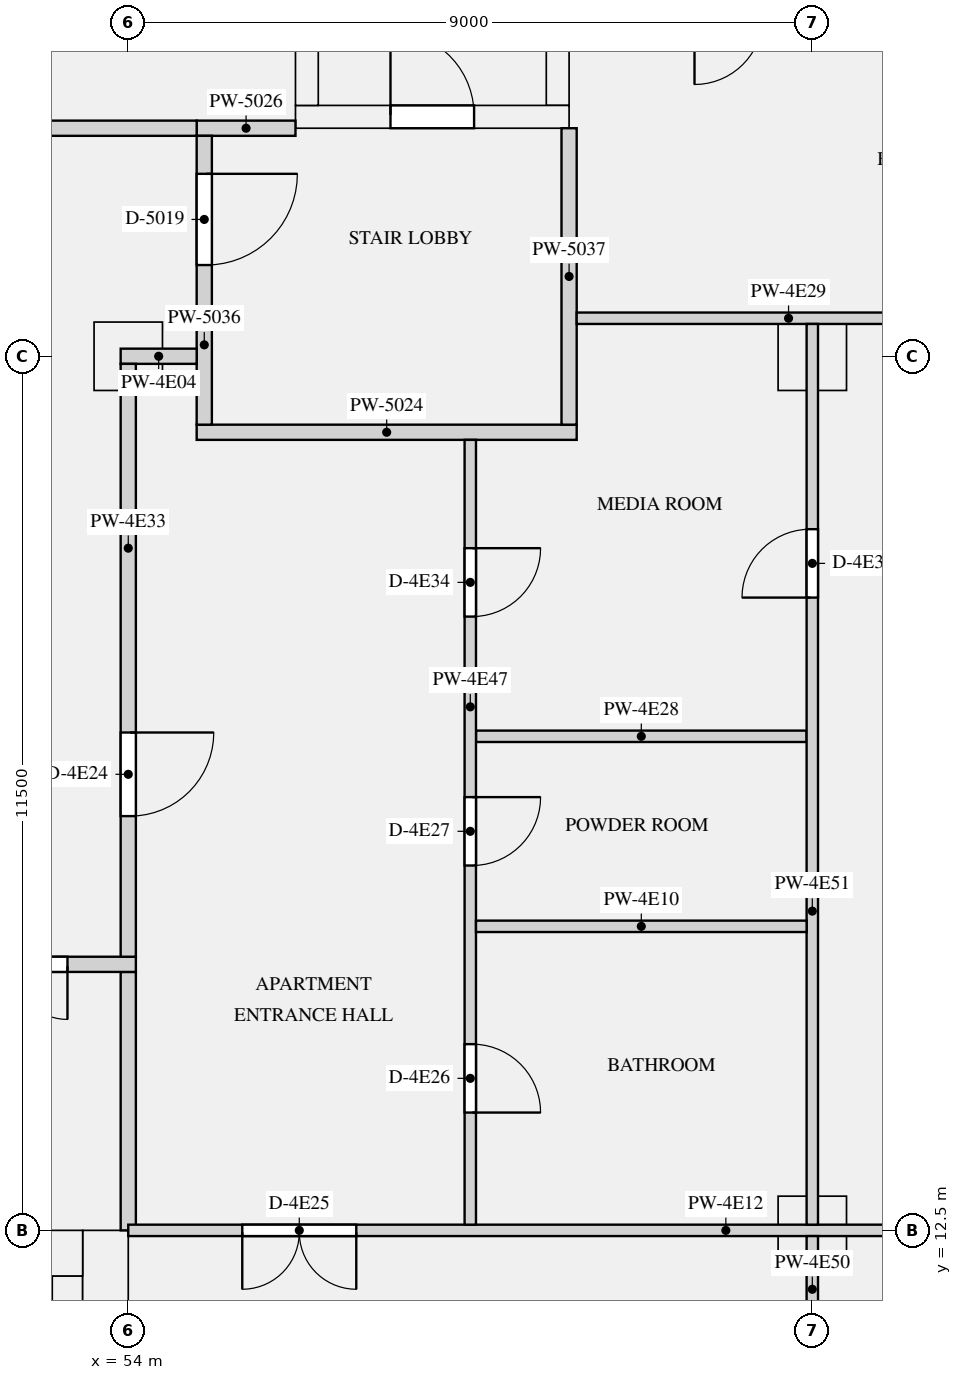
"""IFC4 building model, lengths in metres.
Left out: names, types, materials, properties, quantities, classifications, styles, units other than length and angle.
Written with IfcOpenShell. Run it as: python <this file> out.ifc"""

import sys

from ifc_helpers import new_model, si_unit, direction, frame, frame_2d, origin, origin_2d, place, context, subcontext, project, spatial, rectangle, extrude, element, fill, save


model = new_model("IFC4")
c1 = context("Model", 3, precision=1e-05, world=origin(), true_north=direction((0.0, 1.0)))
c2 = subcontext(c1, "Body", "Model", "MODEL_VIEW")
j1 = project(units=[si_unit("LENGTHUNIT", "METRE"), si_unit("PLANEANGLEUNIT", "RADIAN")], contexts=[c1])
p1 = place(None, origin())
s1 = spatial("IfcSite", under=j1, at=p1, CompositionType="ELEMENT")
p2 = place(p1, origin())
s2 = spatial("IfcBuilding", under=s1, at=p2, CompositionType="ELEMENT")
p3 = place(p2, frame((0.0, 0.0, 229.5)))
s3 = spatial("IfcBuildingStorey", under=s2, at=p3, CompositionType="ELEMENT", Elevation=229.5)
for number, where, z_axis, x_axis in (
    (1, (54.0, 24.0, 0.0), (0.0, 0.0, 1.0), (1.0, 0.0, 0.0)),
    (2, (63.0, 24.0, 0.0), (0.0, 0.0, 1.0), (1.0, 0.0, 0.0)),
    (3, (63.0, 12.5, 0.0), (0.0, 0.0, 1.0), (1.0, 0.0, 0.0)),
):
    element("IfcColumn", number, at=place(p3, frame(where, z_axis=z_axis, x_axis=x_axis)), inside=s3, PredefinedType="COLUMN", context=c2, shape_type="SweptSolid", body=[
        extrude(rectangle(XDim=0.9, YDim=0.9, at=origin_2d()), origin(), (0.0, 0.0, 1.0), 3.15),
    ])
p4 = place(p3, frame((53.7, 0.0, 0.0), z_axis=(0.0, 0.0, 1.0), x_axis=(0.0, 1.0, 0.0)))
e4 = element("IfcWall", 4, at=p4, inside=s3, PredefinedType="SHEAR", context=c2, shape_type="SweptSolid", body=[
    extrude(rectangle(XDim=12.5, YDim=0.6, at=frame_2d((6.25, 0.0))), origin(), (0.0, 0.0, 1.0), 3.15),
])
p5 = place(p3, frame((18.6, 12.2, 0.0), z_axis=(0.0, 0.0, 1.0), x_axis=(1.0, 0.0, 0.0)))
e5 = element("IfcWall", 5, at=p5, inside=s3, PredefinedType="SHEAR", context=c2, shape_type="SweptSolid", body=[
    extrude(rectangle(XDim=34.8, YDim=0.6, at=frame_2d((17.4, 0.0))), origin(), (0.0, 0.0, 1.0), 3.15),
])
p6 = place(p5, frame((24.575, 0.0, 0.0)))
e6 = element("IfcOpeningElement", 6, at=p6, cuts=e5, PredefinedType="OPENING", context=c2, shape_type="SweptSolid", body=[
    extrude(rectangle(XDim=1.1, YDim=2.1, at=frame_2d((0.55, 1.05))), frame((0.0, 0.31, 0.0), z_axis=(0.0, -1.0, 0.0), x_axis=(1.0, 0.0, 0.0)), (0.0, 0.0, 1.0), 0.62),
])
p7 = place(p5, frame((26.825, 0.0, 0.0)))
e7 = element("IfcOpeningElement", 7, at=p7, cuts=e5, PredefinedType="OPENING", context=c2, shape_type="SweptSolid", body=[
    extrude(rectangle(XDim=1.1, YDim=2.1, at=frame_2d((0.55, 1.05))), frame((0.0, 0.31, 0.0), z_axis=(0.0, -1.0, 0.0), x_axis=(1.0, 0.0, 0.0)), (0.0, 0.0, 1.0), 0.62),
])
p8 = place(p5, frame((29.075, 0.0, 0.0)))
e8 = element("IfcOpeningElement", 8, at=p8, cuts=e5, PredefinedType="OPENING", context=c2, shape_type="SweptSolid", body=[
    extrude(rectangle(XDim=1.1, YDim=2.1, at=frame_2d((0.55, 1.05))), frame((0.0, 0.31, 0.0), z_axis=(0.0, -1.0, 0.0), x_axis=(1.0, 0.0, 0.0)), (0.0, 0.0, 1.0), 0.62),
])
p9 = place(p5, frame((4.95, 0.0, 0.0)))
e9 = element("IfcOpeningElement", 9, at=p9, cuts=e5, PredefinedType="OPENING", context=c2, shape_type="SweptSolid", body=[
    extrude(rectangle(XDim=0.9, YDim=2.1, at=frame_2d((0.45, 1.05))), frame((0.0, 0.31, 0.0), z_axis=(0.0, -1.0, 0.0), x_axis=(1.0, 0.0, 0.0)), (0.0, 0.0, 1.0), 0.62),
])
p10 = place(p5, frame((11.95, 0.0, 0.0)))
e10 = element("IfcOpeningElement", 10, at=p10, cuts=e5, PredefinedType="OPENING", context=c2, shape_type="SweptSolid", body=[
    extrude(rectangle(XDim=0.9, YDim=2.1, at=frame_2d((0.45, 1.05))), frame((0.0, 0.31, 0.0), z_axis=(0.0, -1.0, 0.0), x_axis=(1.0, 0.0, 0.0)), (0.0, 0.0, 1.0), 0.62),
])
p11 = place(p5, frame((18.45, 0.0, 0.0)))
e11 = element("IfcOpeningElement", 11, at=p11, cuts=e5, PredefinedType="OPENING", context=c2, shape_type="SweptSolid", body=[
    extrude(rectangle(XDim=0.9, YDim=2.1, at=frame_2d((0.45, 1.05))), frame((0.0, 0.31, 0.0), z_axis=(0.0, -1.0, 0.0), x_axis=(1.0, 0.0, 0.0)), (0.0, 0.0, 1.0), 0.62),
])
p12 = place(p5, frame((1.55, 0.0, 0.0)))
e12 = element("IfcOpeningElement", 12, at=p12, cuts=e5, PredefinedType="OPENING", context=c2, shape_type="SweptSolid", body=[
    extrude(rectangle(XDim=1.2, YDim=2.1, at=frame_2d((0.6, 1.05))), frame((0.0, 0.31, 0.0), z_axis=(0.0, -1.0, 0.0), x_axis=(1.0, 0.0, 0.0)), (0.0, 0.0, 1.0), 0.62),
])
p13 = place(p5, frame((32.05, 0.0, 0.0)))
e13 = element("IfcOpeningElement", 13, at=p13, cuts=e5, PredefinedType="OPENING", context=c2, shape_type="SweptSolid", body=[
    extrude(rectangle(XDim=1.2, YDim=2.1, at=frame_2d((0.6, 1.05))), frame((0.0, 0.31, 0.0), z_axis=(0.0, -1.0, 0.0), x_axis=(1.0, 0.0, 0.0)), (0.0, 0.0, 1.0), 0.62),
])
p14 = place(p3, frame((53.2, 1.0, 0.0), z_axis=(0.0, 0.0, 1.0), x_axis=(0.0, 1.0, 0.0)))
e14 = element("IfcWall", 14, at=p14, inside=s3, PredefinedType="SHEAR", context=c2, shape_type="SweptSolid", body=[
    extrude(rectangle(XDim=10.9, YDim=0.4, at=frame_2d((5.45, 0.0))), origin(), (0.0, 0.0, 1.0), 3.15),
])
p15 = place(p3, frame((56.2, 27.15, 0.0), z_axis=(0.0, 0.0, 1.0), x_axis=(1.0, 0.0, 0.0)))
e15 = element("IfcWall", 15, at=p15, inside=s3, PredefinedType="SHEAR", context=c2, shape_type="SweptSolid", body=[
    extrude(rectangle(XDim=3.6, YDim=0.3, at=frame_2d((1.8, 0.0))), origin(), (0.0, 0.0, 1.0), 3.15),
])
p16 = place(p15, frame((1.25, 0.0, 0.0)))
e16 = element("IfcOpeningElement", 16, at=p16, cuts=e15, PredefinedType="OPENING", context=c2, shape_type="SweptSolid", body=[
    extrude(rectangle(XDim=1.1, YDim=2.1, at=frame_2d((0.55, 1.05))), frame((0.0, 0.16, 0.0), z_axis=(0.0, -1.0, 0.0), x_axis=(1.0, 0.0, 0.0)), (0.0, 0.0, 1.0), 0.32),
])
for number, where, z_axis, x_axis in (
    (17, (56.35, 27.3, 0.0), (0.0, 0.0, 1.0), (0.0, 1.0, 0.0)),
    (18, (59.65, 27.3, 0.0), (0.0, 0.0, 1.0), (0.0, 1.0, 0.0)),
):
    element("IfcWall", number, at=place(p3, frame(where, z_axis=z_axis, x_axis=x_axis)), inside=s3, PredefinedType="SHEAR", context=c2, shape_type="SweptSolid", body=[
        extrude(rectangle(XDim=7.8, YDim=0.3, at=frame_2d((3.9, 0.0))), origin(), (0.0, 0.0, 1.0), 3.15),
    ])
p17 = place(p3, frame((54.9, 23.0, 0.0), z_axis=(0.0, 0.0, 1.0), x_axis=(1.0, 0.0, 0.0)))
e19 = element("IfcWall", 19, at=p17, inside=s3, PredefinedType="PARTITIONING", context=c2, shape_type="SweptSolid", body=[
    extrude(rectangle(XDim=5.0, YDim=0.2, at=frame_2d((2.5, 0.0))), origin(), (0.0, 0.0, 1.0), 2.83),
])
p18 = place(p3, frame((54.9, 27.0, 0.0), z_axis=(0.0, 0.0, 1.0), x_axis=(1.0, 0.0, 0.0)))
e20 = element("IfcWall", 20, at=p18, inside=s3, PredefinedType="PARTITIONING", context=c2, shape_type="SweptSolid", body=[
    extrude(rectangle(XDim=1.3, YDim=0.2, at=frame_2d((0.65, 0.0))), origin(), (0.0, 0.0, 1.0), 2.83),
])
p19 = place(p3, frame((54.0, 12.5, 0.0), z_axis=(0.0, 0.0, 1.0), x_axis=(0.0, 1.0, 0.0)))
e21 = element("IfcWall", 21, at=p19, inside=s3, PredefinedType="PARTITIONING", context=c2, shape_type="SweptSolid", body=[
    extrude(rectangle(XDim=3.4, YDim=0.2, at=frame_2d((1.7, 0.0))), origin(), (0.0, 0.0, 1.0), 2.83),
])
p20 = place(p3, frame((55.0, 23.1, 0.0), z_axis=(0.0, 0.0, 1.0), x_axis=(0.0, 1.0, 0.0)))
e22 = element("IfcWall", 22, at=p20, inside=s3, PredefinedType="PARTITIONING", context=c2, shape_type="SweptSolid", body=[
    extrude(rectangle(XDim=3.8, YDim=0.2, at=frame_2d((1.9, 0.0))), origin(), (0.0, 0.0, 1.0), 2.83),
])
p21 = place(p20, frame((2.1, 0.0, 0.0)))
e23 = element("IfcOpeningElement", 23, at=p21, cuts=e22, PredefinedType="OPENING", context=c2, shape_type="SweptSolid", body=[
    extrude(rectangle(XDim=1.2, YDim=2.1, at=frame_2d((0.6, 1.05))), frame((0.0, 0.11, 0.0), z_axis=(0.0, -1.0, 0.0), x_axis=(1.0, 0.0, 0.0)), (0.0, 0.0, 1.0), 0.22),
])
p22 = place(p3, frame((59.8, 23.1, 0.0), z_axis=(0.0, 0.0, 1.0), x_axis=(0.0, 1.0, 0.0)))
e24 = element("IfcWall", 24, at=p22, inside=s3, PredefinedType="PARTITIONING", context=c2, shape_type="SweptSolid", body=[
    extrude(rectangle(XDim=3.9, YDim=0.2, at=frame_2d((1.95, 0.0))), origin(), (0.0, 0.0, 1.0), 2.83),
])
p23 = place(p3, frame((53.9, 24.0, 0.0), z_axis=(0.0, 0.0, 1.0), x_axis=(1.0, 0.0, 0.0)))
e25 = element("IfcWall", 25, at=p23, inside=s3, PredefinedType="PARTITIONING", context=c2, shape_type="SweptSolid", body=[
    extrude(rectangle(XDim=1.0, YDim=0.2, at=frame_2d((0.5, 0.0))), origin(), (0.0, 0.0, 1.0), 2.83),
])
p24 = place(p3, frame((48.1, 27.0, 0.0), z_axis=(0.0, 0.0, 1.0), x_axis=(1.0, 0.0, 0.0)))
e26 = element("IfcWall", 26, at=p24, inside=s3, PredefinedType="PARTITIONING", context=c2, shape_type="SweptSolid", body=[
    extrude(rectangle(XDim=6.8, YDim=0.2, at=frame_2d((3.4, 0.0))), origin(), (0.0, 0.0, 1.0), 2.83),
])
p25 = place(p3, frame((58.575, 16.5, 0.0), z_axis=(0.0, 0.0, 1.0), x_axis=(1.0, 0.0, 0.0)))
e27 = element("IfcWall", 27, at=p25, inside=s3, PredefinedType="PARTITIONING", context=c2, shape_type="SweptSolid", body=[
    extrude(rectangle(XDim=4.35, YDim=0.15, at=frame_2d((2.175, 0.0))), origin(), (0.0, 0.0, 1.0), 2.83),
])
p26 = place(p3, frame((54.0, 12.5, 0.0), z_axis=(0.0, 0.0, 1.0), x_axis=(1.0, 0.0, 0.0)))
e28 = element("IfcWall", 28, at=p26, inside=s3, PredefinedType="PARTITIONING", context=c2, shape_type="SweptSolid", body=[
    extrude(rectangle(XDim=17.35, YDim=0.15, at=frame_2d((8.675, 0.0))), origin(), (0.0, 0.0, 1.0), 2.83),
])
p27 = place(p26, frame((1.5, 0.0, 0.0)))
e29 = element("IfcOpeningElement", 29, at=p27, cuts=e28, PredefinedType="OPENING", context=c2, shape_type="SweptSolid", body=[
    extrude(rectangle(XDim=1.5, YDim=2.1, at=frame_2d((0.75, 1.05))), frame((0.0, 0.085, 0.0), z_axis=(0.0, -1.0, 0.0), x_axis=(1.0, 0.0, 0.0)), (0.0, 0.0, 1.0), 0.17),
])
p28 = place(p26, frame((12.725, 0.0, 0.0)))
e30 = element("IfcOpeningElement", 30, at=p28, cuts=e28, PredefinedType="OPENING", context=c2, shape_type="SweptSolid", body=[
    extrude(rectangle(XDim=1.5, YDim=2.1, at=frame_2d((0.75, 1.05))), frame((0.0, 0.085, 0.0), z_axis=(0.0, -1.0, 0.0), x_axis=(1.0, 0.0, 0.0)), (0.0, 0.0, 1.0), 0.17),
])
p29 = place(p3, frame((58.575, 19.0, 0.0), z_axis=(0.0, 0.0, 1.0), x_axis=(1.0, 0.0, 0.0)))
e31 = element("IfcWall", 31, at=p29, inside=s3, PredefinedType="PARTITIONING", context=c2, shape_type="SweptSolid", body=[
    extrude(rectangle(XDim=4.35, YDim=0.15, at=frame_2d((2.175, 0.0))), origin(), (0.0, 0.0, 1.0), 2.83),
])
p30 = place(p3, frame((59.9, 24.5, 0.0), z_axis=(0.0, 0.0, 1.0), x_axis=(1.0, 0.0, 0.0)))
e32 = element("IfcWall", 32, at=p30, inside=s3, PredefinedType="PARTITIONING", context=c2, shape_type="SweptSolid", body=[
    extrude(rectangle(XDim=8.95, YDim=0.15, at=frame_2d((4.475, 0.0))), origin(), (0.0, 0.0, 1.0), 2.83),
])
p31 = place(p30, frame((5.575, 0.0, 0.0)))
e33 = element("IfcOpeningElement", 33, at=p31, cuts=e32, PredefinedType="OPENING", context=c2, shape_type="SweptSolid", body=[
    extrude(rectangle(XDim=1.5, YDim=2.1, at=frame_2d((0.75, 1.05))), frame((0.0, 0.085, 0.0), z_axis=(0.0, -1.0, 0.0), x_axis=(1.0, 0.0, 0.0)), (0.0, 0.0, 1.0), 0.17),
])
p32 = place(p3, frame((17.9, 16.0, 0.0), z_axis=(0.0, 0.0, 1.0), x_axis=(1.0, 0.0, 0.0)))
e34 = element("IfcWall", 34, at=p32, inside=s3, PredefinedType="PARTITIONING", context=c2, shape_type="SweptSolid", body=[
    extrude(rectangle(XDim=36.2, YDim=0.2, at=frame_2d((18.1, 0.0))), origin(), (0.0, 0.0, 1.0), 2.83),
])
p33 = place(p32, frame((0.9, 0.0, 0.0)))
e35 = element("IfcOpeningElement", 35, at=p33, cuts=e34, PredefinedType="OPENING", context=c2, shape_type="SweptSolid", body=[
    extrude(rectangle(XDim=1.4, YDim=2.1, at=frame_2d((0.7, 1.05))), frame((0.0, 0.11, 0.0), z_axis=(0.0, -1.0, 0.0), x_axis=(1.0, 0.0, 0.0)), (0.0, 0.0, 1.0), 0.22),
])
p34 = place(p32, frame((33.9, 0.0, 0.0)))
e36 = element("IfcOpeningElement", 36, at=p34, cuts=e34, PredefinedType="OPENING", context=c2, shape_type="SweptSolid", body=[
    extrude(rectangle(XDim=1.4, YDim=2.1, at=frame_2d((0.7, 1.05))), frame((0.0, 0.11, 0.0), z_axis=(0.0, -1.0, 0.0), x_axis=(1.0, 0.0, 0.0)), (0.0, 0.0, 1.0), 0.22),
])
p35 = place(p3, frame((54.0, 16.1, 0.0), z_axis=(0.0, 0.0, 1.0), x_axis=(0.0, 1.0, 0.0)))
e37 = element("IfcWall", 37, at=p35, inside=s3, PredefinedType="PARTITIONING", context=c2, shape_type="SweptSolid", body=[
    extrude(rectangle(XDim=7.8, YDim=0.2, at=frame_2d((3.9, 0.0))), origin(), (0.0, 0.0, 1.0), 2.83),
])
p36 = place(p35, frame((1.85, 0.0, 0.0)))
e38 = element("IfcOpeningElement", 38, at=p36, cuts=e37, PredefinedType="OPENING", context=c2, shape_type="SweptSolid", body=[
    extrude(rectangle(XDim=1.1, YDim=2.1, at=frame_2d((0.55, 1.05))), frame((0.0, 0.11, 0.0), z_axis=(0.0, -1.0, 0.0), x_axis=(1.0, 0.0, 0.0)), (0.0, 0.0, 1.0), 0.22),
])
p37 = place(p3, frame((58.5, 12.575, 0.0), z_axis=(0.0, 0.0, 1.0), x_axis=(0.0, 1.0, 0.0)))
e39 = element("IfcWall", 39, at=p37, inside=s3, PredefinedType="PARTITIONING", context=c2, shape_type="SweptSolid", body=[
    extrude(rectangle(XDim=10.325, YDim=0.15, at=frame_2d((5.163, 0.0))), origin(), (0.0, 0.0, 1.0), 2.83),
])
p38 = place(p37, frame((1.475, 0.0, 0.0)))
e40 = element("IfcOpeningElement", 40, at=p38, cuts=e39, PredefinedType="OPENING", context=c2, shape_type="SweptSolid", body=[
    extrude(rectangle(XDim=0.9, YDim=2.1, at=frame_2d((0.45, 1.05))), frame((0.0, 0.085, 0.0), z_axis=(0.0, -1.0, 0.0), x_axis=(1.0, 0.0, 0.0)), (0.0, 0.0, 1.0), 0.17),
])
p39 = place(p37, frame((4.725, 0.0, 0.0)))
e41 = element("IfcOpeningElement", 41, at=p39, cuts=e39, PredefinedType="OPENING", context=c2, shape_type="SweptSolid", body=[
    extrude(rectangle(XDim=0.9, YDim=2.1, at=frame_2d((0.45, 1.05))), frame((0.0, 0.085, 0.0), z_axis=(0.0, -1.0, 0.0), x_axis=(1.0, 0.0, 0.0)), (0.0, 0.0, 1.0), 0.17),
])
p40 = place(p37, frame((8.0, 0.0, 0.0)))
e42 = element("IfcOpeningElement", 42, at=p40, cuts=e39, PredefinedType="OPENING", context=c2, shape_type="SweptSolid", body=[
    extrude(rectangle(XDim=0.9, YDim=2.1, at=frame_2d((0.45, 1.05))), frame((0.0, 0.085, 0.0), z_axis=(0.0, -1.0, 0.0), x_axis=(1.0, 0.0, 0.0)), (0.0, 0.0, 1.0), 0.17),
])
p41 = place(p3, frame((63.0, 8.575, 0.0), z_axis=(0.0, 0.0, 1.0), x_axis=(0.0, 1.0, 0.0)))
e43 = element("IfcWall", 43, at=p41, inside=s3, PredefinedType="PARTITIONING", context=c2, shape_type="SweptSolid", body=[
    extrude(rectangle(XDim=3.85, YDim=0.15, at=frame_2d((1.925, 0.0))), origin(), (0.0, 0.0, 1.0), 2.83),
])
p42 = place(p41, frame((0.95, 0.0, 0.0)))
e44 = element("IfcOpeningElement", 44, at=p42, cuts=e43, PredefinedType="OPENING", context=c2, shape_type="SweptSolid", body=[
    extrude(rectangle(XDim=1.5, YDim=2.1, at=frame_2d((0.75, 1.05))), frame((0.0, 0.085, 0.0), z_axis=(0.0, -1.0, 0.0), x_axis=(1.0, 0.0, 0.0)), (0.0, 0.0, 1.0), 0.17),
])
p43 = place(p3, frame((63.0, 12.575, 0.0), z_axis=(0.0, 0.0, 1.0), x_axis=(0.0, 1.0, 0.0)))
e45 = element("IfcWall", 45, at=p43, inside=s3, PredefinedType="PARTITIONING", context=c2, shape_type="SweptSolid", body=[
    extrude(rectangle(XDim=11.85, YDim=0.15, at=frame_2d((5.925, 0.0))), origin(), (0.0, 0.0, 1.0), 2.83),
])
p44 = place(p43, frame((8.25, 0.0, 0.0)))
e46 = element("IfcOpeningElement", 46, at=p44, cuts=e45, PredefinedType="OPENING", context=c2, shape_type="SweptSolid", body=[
    extrude(rectangle(XDim=0.9, YDim=2.1, at=frame_2d((0.45, 1.05))), frame((0.0, 0.085, 0.0), z_axis=(0.0, -1.0, 0.0), x_axis=(1.0, 0.0, 0.0)), (0.0, 0.0, 1.0), 0.17),
])
p45 = place(p16, origin())
e47 = element("IfcDoor", 47, at=p45, inside=s3, OperationType="SINGLE_SWING_LEFT", PredefinedType="DOOR", context=c2, shape_type="SweptSolid", body=[
    extrude(rectangle(XDim=1.1, YDim=2.1, at=frame_2d((0.55, 1.05))), frame((0.0, 0.025, 0.0), z_axis=(0.0, -1.0, 0.0), x_axis=(1.0, 0.0, 0.0)), (0.0, 0.0, 1.0), 0.05),
])
fill(e16, e47)
p46 = place(p21, frame((1.2, 0.0, 0.0), z_axis=(0.0, 0.0, 1.0), x_axis=(-1.0, 0.0, 0.0)))
e48 = element("IfcDoor", 48, at=p46, inside=s3, OperationType="SINGLE_SWING_LEFT", PredefinedType="DOOR", context=c2, shape_type="SweptSolid", body=[
    extrude(rectangle(XDim=1.2, YDim=2.1, at=frame_2d((0.6, 1.05))), frame((0.0, 0.025, 0.0), z_axis=(0.0, -1.0, 0.0), x_axis=(1.0, 0.0, 0.0)), (0.0, 0.0, 1.0), 0.05),
])
fill(e23, e48)
p47 = place(p34, frame((1.4, 0.0, 0.0), z_axis=(0.0, 0.0, 1.0), x_axis=(-1.0, 0.0, 0.0)))
e49 = element("IfcDoor", 49, at=p47, inside=s3, OperationType="DOUBLE_DOOR_SINGLE_SWING", PredefinedType="DOOR", context=c2, shape_type="SweptSolid", body=[
    extrude(rectangle(XDim=1.4, YDim=2.1, at=frame_2d((0.7, 1.05))), frame((0.0, 0.025, 0.0), z_axis=(0.0, -1.0, 0.0), x_axis=(1.0, 0.0, 0.0)), (0.0, 0.0, 1.0), 0.05),
])
fill(e36, e49)
p48 = place(p36, frame((1.1, 0.0, 0.0), z_axis=(0.0, 0.0, 1.0), x_axis=(-1.0, 0.0, 0.0)))
e50 = element("IfcDoor", 50, at=p48, inside=s3, OperationType="SINGLE_SWING_LEFT", PredefinedType="DOOR", context=c2, shape_type="SweptSolid", body=[
    extrude(rectangle(XDim=1.1, YDim=2.1, at=frame_2d((0.55, 1.05))), frame((0.0, 0.025, 0.0), z_axis=(0.0, -1.0, 0.0), x_axis=(1.0, 0.0, 0.0)), (0.0, 0.0, 1.0), 0.05),
])
fill(e38, e50)
p49 = place(p27, frame((1.5, 0.0, 0.0), z_axis=(0.0, 0.0, 1.0), x_axis=(-1.0, 0.0, 0.0)))
e51 = element("IfcDoor", 51, at=p49, inside=s3, OperationType="DOUBLE_DOOR_SINGLE_SWING", PredefinedType="DOOR", context=c2, shape_type="SweptSolid", body=[
    extrude(rectangle(XDim=1.5, YDim=2.1, at=frame_2d((0.75, 1.05))), frame((0.0, 0.025, 0.0), z_axis=(0.0, -1.0, 0.0), x_axis=(1.0, 0.0, 0.0)), (0.0, 0.0, 1.0), 0.05),
])
fill(e29, e51)
p50 = place(p38, frame((0.9, 0.0, 0.0), z_axis=(0.0, 0.0, 1.0), x_axis=(-1.0, 0.0, 0.0)))
e52 = element("IfcDoor", 52, at=p50, inside=s3, OperationType="SINGLE_SWING_RIGHT", PredefinedType="DOOR", context=c2, shape_type="SweptSolid", body=[
    extrude(rectangle(XDim=0.9, YDim=2.1, at=frame_2d((0.45, 1.05))), frame((0.0, 0.025, 0.0), z_axis=(0.0, -1.0, 0.0), x_axis=(1.0, 0.0, 0.0)), (0.0, 0.0, 1.0), 0.05),
])
fill(e40, e52)
p51 = place(p39, frame((0.9, 0.0, 0.0), z_axis=(0.0, 0.0, 1.0), x_axis=(-1.0, 0.0, 0.0)))
e53 = element("IfcDoor", 53, at=p51, inside=s3, OperationType="SINGLE_SWING_LEFT", PredefinedType="DOOR", context=c2, shape_type="SweptSolid", body=[
    extrude(rectangle(XDim=0.9, YDim=2.1, at=frame_2d((0.45, 1.05))), frame((0.0, 0.025, 0.0), z_axis=(0.0, -1.0, 0.0), x_axis=(1.0, 0.0, 0.0)), (0.0, 0.0, 1.0), 0.05),
])
fill(e41, e53)
p52 = place(p40, frame((0.9, 0.0, 0.0), z_axis=(0.0, 0.0, 1.0), x_axis=(-1.0, 0.0, 0.0)))
e54 = element("IfcDoor", 54, at=p52, inside=s3, OperationType="SINGLE_SWING_LEFT", PredefinedType="DOOR", context=c2, shape_type="SweptSolid", body=[
    extrude(rectangle(XDim=0.9, YDim=2.1, at=frame_2d((0.45, 1.05))), frame((0.0, 0.025, 0.0), z_axis=(0.0, -1.0, 0.0), x_axis=(1.0, 0.0, 0.0)), (0.0, 0.0, 1.0), 0.05),
])
fill(e42, e54)
p53 = place(p44, origin())
e55 = element("IfcDoor", 55, at=p53, inside=s3, OperationType="SINGLE_SWING_LEFT", PredefinedType="DOOR", context=c2, shape_type="SweptSolid", body=[
    extrude(rectangle(XDim=0.9, YDim=2.1, at=frame_2d((0.45, 1.05))), frame((0.0, 0.025, 0.0), z_axis=(0.0, -1.0, 0.0), x_axis=(1.0, 0.0, 0.0)), (0.0, 0.0, 1.0), 0.05),
])
fill(e46, e55)
save(model, sys.argv[1])
